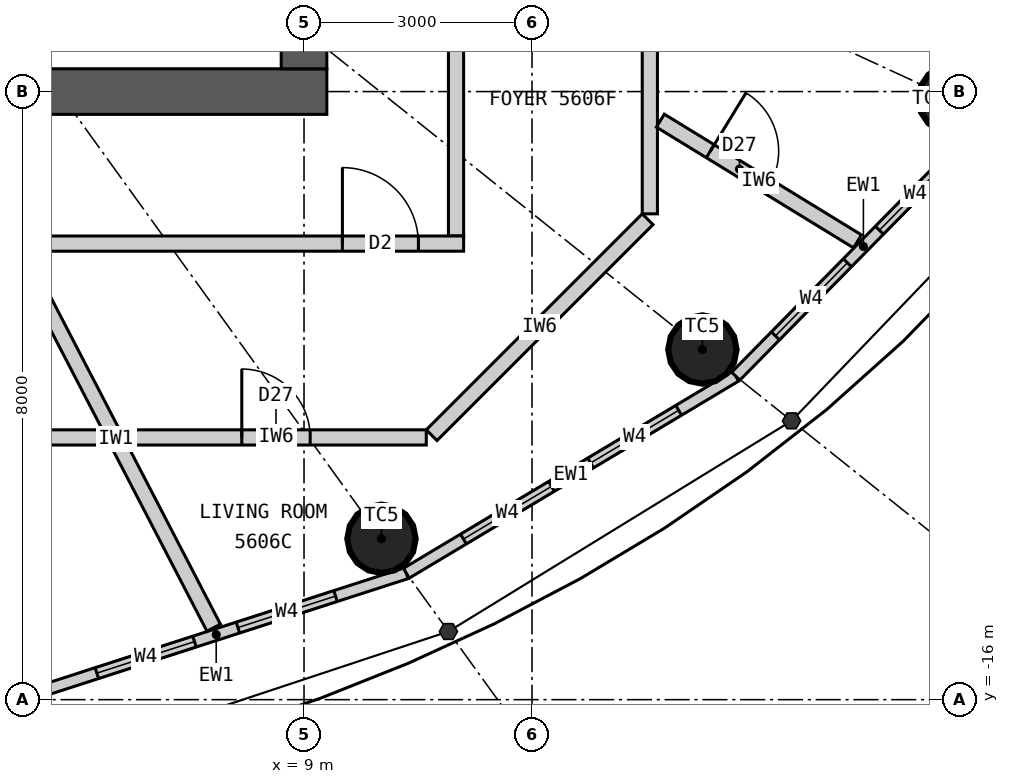
"""IFC4 building model, lengths in metres.
Left out: names, types, materials, properties, quantities, classifications, styles, units other than length and angle.
Written with IfcOpenShell. Run it as: python <this file> out.ifc"""

import sys

from ifc_helpers import new_model, si_unit, direction, frame, frame_2d, origin, origin_2d, place, context, subcontext, project, spatial, rectangle, circle, extrude, element, fill, save


model = new_model("IFC4")
c1 = context("Model", 3, precision=1e-05, world=origin(), true_north=direction((0.0, 1.0)))
c2 = subcontext(c1, "Body", "Model", "MODEL_VIEW")
j1 = project(units=[si_unit("LENGTHUNIT", "METRE"), si_unit("PLANEANGLEUNIT", "RADIAN")], contexts=[c1])
p1 = place(None, origin())
s1 = spatial("IfcSite", under=j1, at=p1, CompositionType="ELEMENT")
p2 = place(p1, origin())
s2 = spatial("IfcBuilding", under=s1, at=p2, CompositionType="ELEMENT")
p3 = place(p2, frame((0.0, 0.0, 209.4)))
s3 = spatial("IfcBuildingStorey", under=s2, at=p3, CompositionType="ELEMENT", Elevation=209.4)
for number, where, z_axis, x_axis in (
    (1, (10.019, -13.883, 0.0), (0.0, 0.0, 1.0), (1.0, 0.0, 0.0)),
    (2, (14.241, -11.393, 0.0), (0.0, 0.0, 1.0), (1.0, 0.0, 0.0)),
    (3, (17.532, -8.098, 0.0), (0.0, 0.0, 1.0), (1.0, 0.0, 0.0)),
):
    element("IfcColumn", number, at=place(p3, frame(where, z_axis=z_axis, x_axis=x_axis)), inside=s3, PredefinedType="COLUMN", context=c2, shape_type="SweptSolid", body=[
        extrude(circle(Radius=0.45, at=origin_2d()), origin(), (0.0, 0.0, 1.0), 3.3),
    ])
p4 = place(p3, frame((9.3, -8.0, 0.0), z_axis=(0.0, 0.0, 1.0), x_axis=(-1.0, 0.0, 0.0)))
e4 = element("IfcWall", 4, at=p4, inside=s3, PredefinedType="SHEAR", context=c2, shape_type="SweptSolid", body=[
    extrude(rectangle(XDim=18.6, YDim=0.6, at=frame_2d((9.3, 0.0))), origin(), (0.0, 0.0, 1.0), 3.3),
])
p5 = place(p4, frame((8.0, 0.0, 0.0)))
e5 = element("IfcOpeningElement", 5, at=p5, cuts=e4, PredefinedType="OPENING", context=c2, shape_type="SweptSolid", body=[
    extrude(rectangle(XDim=1.2, YDim=2.2, at=frame_2d((0.6, 1.1))), frame((0.0, 0.31, 0.0), z_axis=(0.0, -1.0, 0.0), x_axis=(1.0, 0.0, 0.0)), (0.0, 0.0, 1.0), 0.62),
])
p6 = place(p4, frame((15.6, 0.0, 0.0)))
e6 = element("IfcOpeningElement", 6, at=p6, cuts=e4, PredefinedType="OPENING", context=c2, shape_type="SweptSolid", body=[
    extrude(rectangle(XDim=0.9, YDim=2.2, at=frame_2d((0.45, 1.1))), frame((0.0, 0.31, 0.0), z_axis=(0.0, -1.0, 0.0), x_axis=(1.0, 0.0, 0.0)), (0.0, 0.0, 1.0), 0.62),
])
p7 = place(p3, frame((9.0, -7.7, 0.0), z_axis=(0.0, 0.0, 1.0), x_axis=(0.0, 1.0, 0.0)))
e7 = element("IfcWall", 7, at=p7, inside=s3, PredefinedType="SHEAR", context=c2, shape_type="SweptSolid", body=[
    extrude(rectangle(XDim=15.4, YDim=0.6, at=frame_2d((7.7, 0.0))), origin(), (0.0, 0.0, 1.0), 3.3),
])
p8 = place(p7, frame((6.8, 0.0, 0.0)))
e8 = element("IfcOpeningElement", 8, at=p8, cuts=e7, PredefinedType="OPENING", context=c2, shape_type="SweptSolid", body=[
    extrude(rectangle(XDim=1.8, YDim=2.2, at=frame_2d((0.9, 1.1))), frame((0.0, 0.31, 0.0), z_axis=(0.0, -1.0, 0.0), x_axis=(1.0, 0.0, 0.0)), (0.0, 0.0, 1.0), 0.62),
])
p9 = place(p3, frame((5.343, -15.952, 0.0), z_axis=(0.0, 0.0, 1.0), x_axis=(0.951644702515, 0.307200846638, 0.0)))
e9 = element("IfcWall", 9, at=p9, inside=s3, PredefinedType="ELEMENTEDWALL", context=c2, shape_type="SweptSolid", body=[
    extrude(rectangle(XDim=5.258, YDim=0.15, at=frame_2d((2.629, 0.0))), origin(), (0.0, 0.0, 1.0), 3.12),
])
p10 = place(p9, frame((0.979, 0.0, 0.9)))
e10 = element("IfcOpeningElement", 10, at=p10, cuts=e9, PredefinedType="OPENING", context=c2, shape_type="SweptSolid", body=[
    extrude(rectangle(XDim=1.35, YDim=1.9, at=frame_2d((0.675, 0.95))), frame((0.0, 0.085, 0.0), z_axis=(0.0, -1.0, 0.0), x_axis=(1.0, 0.0, 0.0)), (0.0, 0.0, 1.0), 0.17),
])
p11 = place(p9, frame((2.929, 0.0, 0.9)))
e11 = element("IfcOpeningElement", 11, at=p11, cuts=e9, PredefinedType="OPENING", context=c2, shape_type="SweptSolid", body=[
    extrude(rectangle(XDim=1.35, YDim=1.9, at=frame_2d((0.675, 0.95))), frame((0.0, 0.085, 0.0), z_axis=(0.0, -1.0, 0.0), x_axis=(1.0, 0.0, 0.0)), (0.0, 0.0, 1.0), 0.17),
])
p12 = place(p3, frame((10.346, -14.336, 0.0), z_axis=(0.0, 0.0, 1.0), x_axis=(0.85822150553, 0.513279502265, 0.0)))
e12 = element("IfcWall", 12, at=p12, inside=s3, PredefinedType="ELEMENTEDWALL", context=c2, shape_type="SweptSolid", body=[
    extrude(rectangle(XDim=5.05, YDim=0.15, at=frame_2d((2.525, 0.0))), origin(), (0.0, 0.0, 1.0), 3.12),
])
p13 = place(p12, frame((0.875, 0.0, 0.9)))
e13 = element("IfcOpeningElement", 13, at=p13, cuts=e12, PredefinedType="OPENING", context=c2, shape_type="SweptSolid", body=[
    extrude(rectangle(XDim=1.35, YDim=1.9, at=frame_2d((0.675, 0.95))), frame((0.0, 0.085, 0.0), z_axis=(0.0, -1.0, 0.0), x_axis=(1.0, 0.0, 0.0)), (0.0, 0.0, 1.0), 0.17),
])
p14 = place(p12, frame((2.825, 0.0, 0.9)))
e14 = element("IfcOpeningElement", 14, at=p14, cuts=e12, PredefinedType="OPENING", context=c2, shape_type="SweptSolid", body=[
    extrude(rectangle(XDim=1.35, YDim=1.9, at=frame_2d((0.675, 0.95))), frame((0.0, 0.085, 0.0), z_axis=(0.0, -1.0, 0.0), x_axis=(1.0, 0.0, 0.0)), (0.0, 0.0, 1.0), 0.17),
])
p15 = place(p3, frame((14.68, -11.744, 0.0), z_axis=(0.0, 0.0, 1.0), x_axis=(0.701527379618, 0.712642501993, 0.0)))
e15 = element("IfcWall", 15, at=p15, inside=s3, PredefinedType="ELEMENTEDWALL", context=c2, shape_type="SweptSolid", body=[
    extrude(rectangle(XDim=4.788, YDim=0.15, at=frame_2d((2.394, 0.0))), origin(), (0.0, 0.0, 1.0), 3.12),
])
p16 = place(p15, frame((0.744, 0.0, 0.9)))
e16 = element("IfcOpeningElement", 16, at=p16, cuts=e15, PredefinedType="OPENING", context=c2, shape_type="SweptSolid", body=[
    extrude(rectangle(XDim=1.35, YDim=1.9, at=frame_2d((0.675, 0.95))), frame((0.0, 0.085, 0.0), z_axis=(0.0, -1.0, 0.0), x_axis=(1.0, 0.0, 0.0)), (0.0, 0.0, 1.0), 0.17),
])
p17 = place(p15, frame((2.694, 0.0, 0.9)))
e17 = element("IfcOpeningElement", 17, at=p17, cuts=e15, PredefinedType="OPENING", context=c2, shape_type="SweptSolid", body=[
    extrude(rectangle(XDim=1.35, YDim=1.9, at=frame_2d((0.675, 0.95))), frame((0.0, 0.085, 0.0), z_axis=(0.0, -1.0, 0.0), x_axis=(1.0, 0.0, 0.0)), (0.0, 0.0, 1.0), 0.17),
])
p18 = place(p3, frame((11.0, -9.9, 0.0), z_axis=(0.0, 0.0, 1.0), x_axis=(0.0, 1.0, 0.0)))
e18 = element("IfcWall", 18, at=p18, inside=s3, PredefinedType="PARTITIONING", context=c2, shape_type="SweptSolid", body=[
    extrude(rectangle(XDim=19.8, YDim=0.2, at=frame_2d((9.9, 0.0))), origin(), (0.0, 0.0, 1.0), 3.12),
])
p19 = place(p3, frame((11.1, -10.0, 0.0), z_axis=(0.0, 0.0, 1.0), x_axis=(-1.0, 0.0, 0.0)))
e19 = element("IfcWall", 19, at=p19, inside=s3, PredefinedType="PARTITIONING", context=c2, shape_type="SweptSolid", body=[
    extrude(rectangle(XDim=22.2, YDim=0.2, at=frame_2d((11.1, 0.0))), origin(), (0.0, 0.0, 1.0), 3.12),
])
p20 = place(p19, frame((11.36, 0.0, 0.0)))
e20 = element("IfcOpeningElement", 20, at=p20, cuts=e19, PredefinedType="OPENING", context=c2, shape_type="SweptSolid", body=[
    extrude(rectangle(XDim=1.0, YDim=2.2, at=frame_2d((0.5, 1.1))), frame((0.0, 0.11, 0.0), z_axis=(0.0, -1.0, 0.0), x_axis=(1.0, 0.0, 0.0)), (0.0, 0.0, 1.0), 0.22),
])
p21 = place(p19, frame((0.595, 0.0, 0.0)))
e21 = element("IfcOpeningElement", 21, at=p21, cuts=e19, PredefinedType="OPENING", context=c2, shape_type="SweptSolid", body=[
    extrude(rectangle(XDim=1.0, YDim=2.2, at=frame_2d((0.5, 1.1))), frame((0.0, 0.11, 0.0), z_axis=(0.0, -1.0, 0.0), x_axis=(1.0, 0.0, 0.0)), (0.0, 0.0, 1.0), 0.22),
])
p22 = place(p3, frame((5.241, -10.1, 0.0), z_axis=(0.0, 0.0, 1.0), x_axis=(0.460603196597, -0.887606160008, 0.0)))
e22 = element("IfcWall", 22, at=p22, inside=s3, PredefinedType="PARTITIONING", context=c2, shape_type="SweptSolid", body=[
    extrude(rectangle(XDim=5.58, YDim=0.2, at=frame_2d((2.79, 0.0))), origin(), (0.0, 0.0, 1.0), 3.12),
])
p23 = place(p3, frame((-4.082, -12.55, 0.0), z_axis=(0.0, 0.0, 1.0), x_axis=(1.0, 0.0, 0.0)))
e23 = element("IfcWall", 23, at=p23, inside=s3, PredefinedType="PARTITIONING", context=c2, shape_type="SweptSolid", body=[
    extrude(rectangle(XDim=10.446, YDim=0.2, at=frame_2d((5.223, 0.0))), origin(), (0.0, 0.0, 1.0), 3.12),
])
p24 = place(p23, frame((6.757, 0.0, 0.0)))
e24 = element("IfcOpeningElement", 24, at=p24, cuts=e23, PredefinedType="OPENING", context=c2, shape_type="SweptSolid", body=[
    extrude(rectangle(XDim=0.8, YDim=2.1, at=frame_2d((0.4, 1.05))), frame((0.0, 0.11, 0.0), z_axis=(0.0, -1.0, 0.0), x_axis=(1.0, 0.0, 0.0)), (0.0, 0.0, 1.0), 0.22),
])
p25 = place(p23, frame((3.372, 0.0, 0.0)))
e25 = element("IfcOpeningElement", 25, at=p25, cuts=e23, PredefinedType="OPENING", context=c2, shape_type="SweptSolid", body=[
    extrude(rectangle(XDim=0.9, YDim=2.1, at=frame_2d((0.45, 1.05))), frame((0.0, 0.11, 0.0), z_axis=(0.0, -1.0, 0.0), x_axis=(1.0, 0.0, 0.0)), (0.0, 0.0, 1.0), 0.22),
])
p26 = place(p3, frame((6.661, -12.55, 0.0), z_axis=(0.0, 0.0, 1.0), x_axis=(1.0, 0.0, 0.0)))
e26 = element("IfcWall", 26, at=p26, inside=s3, PredefinedType="PARTITIONING", context=c2, shape_type="SweptSolid", body=[
    extrude(rectangle(XDim=3.947, YDim=0.2, at=frame_2d((1.974, 0.0))), origin(), (0.0, 0.0, 1.0), 3.12),
])
p27 = place(p26, frame((1.52, 0.0, 0.0)))
e27 = element("IfcOpeningElement", 27, at=p27, cuts=e26, PredefinedType="OPENING", context=c2, shape_type="SweptSolid", body=[
    extrude(rectangle(XDim=0.9, YDim=2.1, at=frame_2d((0.45, 1.05))), frame((0.0, 0.11, 0.0), z_axis=(0.0, -1.0, 0.0), x_axis=(1.0, 0.0, 0.0)), (0.0, 0.0, 1.0), 0.22),
])
p28 = place(p3, frame((10.679, -12.521, 0.0), z_axis=(0.0, 0.0, 1.0), x_axis=(0.707106781187, 0.707106781187, 0.0)))
e28 = element("IfcWall", 28, at=p28, inside=s3, PredefinedType="PARTITIONING", context=c2, shape_type="SweptSolid", body=[
    extrude(rectangle(XDim=4.019, YDim=0.2, at=frame_2d((2.009, 0.0))), origin(), (0.0, 0.0, 1.0), 3.12),
])
p29 = place(p3, frame((13.55, -9.609, 0.0), z_axis=(0.0, 0.0, 1.0), x_axis=(0.0, 1.0, 0.0)))
e29 = element("IfcWall", 29, at=p29, inside=s3, PredefinedType="PARTITIONING", context=c2, shape_type="SweptSolid", body=[
    extrude(rectangle(XDim=10.93, YDim=0.2, at=frame_2d((5.465, 0.0))), origin(), (0.0, 0.0, 1.0), 3.12),
])
p30 = place(p29, frame((5.02, 0.0, 0.0)))
e30 = element("IfcOpeningElement", 30, at=p30, cuts=e29, PredefinedType="OPENING", context=c2, shape_type="SweptSolid", body=[
    extrude(rectangle(XDim=0.9, YDim=2.1, at=frame_2d((0.45, 1.05))), frame((0.0, 0.11, 0.0), z_axis=(0.0, -1.0, 0.0), x_axis=(1.0, 0.0, 0.0)), (0.0, 0.0, 1.0), 0.22),
])
p31 = place(p29, frame((6.877, 0.0, 0.0)))
e31 = element("IfcOpeningElement", 31, at=p31, cuts=e29, PredefinedType="OPENING", context=c2, shape_type="SweptSolid", body=[
    extrude(rectangle(XDim=0.9, YDim=2.1, at=frame_2d((0.45, 1.05))), frame((0.0, 0.11, 0.0), z_axis=(0.0, -1.0, 0.0), x_axis=(1.0, 0.0, 0.0)), (0.0, 0.0, 1.0), 0.22),
])
p32 = place(p29, frame((8.565, 0.0, 0.0)))
e32 = element("IfcOpeningElement", 32, at=p32, cuts=e29, PredefinedType="OPENING", context=c2, shape_type="SweptSolid", body=[
    extrude(rectangle(XDim=0.8, YDim=2.1, at=frame_2d((0.4, 1.05))), frame((0.0, 0.11, 0.0), z_axis=(0.0, -1.0, 0.0), x_axis=(1.0, 0.0, 0.0)), (0.0, 0.0, 1.0), 0.22),
])
p33 = place(p3, frame((13.688, -8.382, 0.0), z_axis=(0.0, 0.0, 1.0), x_axis=(0.852783459586, -0.522264656144, 0.0)))
e33 = element("IfcWall", 33, at=p33, inside=s3, PredefinedType="PARTITIONING", context=c2, shape_type="SweptSolid", body=[
    extrude(rectangle(XDim=3.042, YDim=0.2, at=frame_2d((1.521, 0.0))), origin(), (0.0, 0.0, 1.0), 3.12),
])
p34 = place(p33, frame((0.77, 0.0, 0.0)))
e34 = element("IfcOpeningElement", 34, at=p34, cuts=e33, PredefinedType="OPENING", context=c2, shape_type="SweptSolid", body=[
    extrude(rectangle(XDim=0.9, YDim=2.1, at=frame_2d((0.45, 1.05))), frame((0.0, 0.11, 0.0), z_axis=(0.0, -1.0, 0.0), x_axis=(1.0, 0.0, 0.0)), (0.0, 0.0, 1.0), 0.22),
])
p35 = place(p10, origin())
e35 = element("IfcWindow", 35, at=p35, inside=s3, PartitioningType="SINGLE_PANEL", PredefinedType="WINDOW", context=c2, shape_type="SweptSolid", body=[
    extrude(rectangle(XDim=1.35, YDim=1.9, at=frame_2d((0.675, 0.95))), frame((0.0, 0.03, 0.0), z_axis=(0.0, -1.0, 0.0), x_axis=(1.0, 0.0, 0.0)), (0.0, 0.0, 1.0), 0.06),
])
fill(e10, e35)
p36 = place(p11, origin())
e36 = element("IfcWindow", 36, at=p36, inside=s3, PartitioningType="SINGLE_PANEL", PredefinedType="WINDOW", context=c2, shape_type="SweptSolid", body=[
    extrude(rectangle(XDim=1.35, YDim=1.9, at=frame_2d((0.675, 0.95))), frame((0.0, 0.03, 0.0), z_axis=(0.0, -1.0, 0.0), x_axis=(1.0, 0.0, 0.0)), (0.0, 0.0, 1.0), 0.06),
])
fill(e11, e36)
p37 = place(p13, origin())
e37 = element("IfcWindow", 37, at=p37, inside=s3, PartitioningType="SINGLE_PANEL", PredefinedType="WINDOW", context=c2, shape_type="SweptSolid", body=[
    extrude(rectangle(XDim=1.35, YDim=1.9, at=frame_2d((0.675, 0.95))), frame((0.0, 0.03, 0.0), z_axis=(0.0, -1.0, 0.0), x_axis=(1.0, 0.0, 0.0)), (0.0, 0.0, 1.0), 0.06),
])
fill(e13, e37)
p38 = place(p14, origin())
e38 = element("IfcWindow", 38, at=p38, inside=s3, PartitioningType="SINGLE_PANEL", PredefinedType="WINDOW", context=c2, shape_type="SweptSolid", body=[
    extrude(rectangle(XDim=1.35, YDim=1.9, at=frame_2d((0.675, 0.95))), frame((0.0, 0.03, 0.0), z_axis=(0.0, -1.0, 0.0), x_axis=(1.0, 0.0, 0.0)), (0.0, 0.0, 1.0), 0.06),
])
fill(e14, e38)
p39 = place(p16, origin())
e39 = element("IfcWindow", 39, at=p39, inside=s3, PartitioningType="SINGLE_PANEL", PredefinedType="WINDOW", context=c2, shape_type="SweptSolid", body=[
    extrude(rectangle(XDim=1.35, YDim=1.9, at=frame_2d((0.675, 0.95))), frame((0.0, 0.03, 0.0), z_axis=(0.0, -1.0, 0.0), x_axis=(1.0, 0.0, 0.0)), (0.0, 0.0, 1.0), 0.06),
])
fill(e16, e39)
p40 = place(p17, origin())
e40 = element("IfcWindow", 40, at=p40, inside=s3, PartitioningType="SINGLE_PANEL", PredefinedType="WINDOW", context=c2, shape_type="SweptSolid", body=[
    extrude(rectangle(XDim=1.35, YDim=1.9, at=frame_2d((0.675, 0.95))), frame((0.0, 0.03, 0.0), z_axis=(0.0, -1.0, 0.0), x_axis=(1.0, 0.0, 0.0)), (0.0, 0.0, 1.0), 0.06),
])
fill(e17, e40)
p41 = place(p21, origin())
e41 = element("IfcDoor", 41, at=p41, inside=s3, OperationType="SINGLE_SWING_RIGHT", PredefinedType="DOOR", context=c2, shape_type="SweptSolid", body=[
    extrude(rectangle(XDim=1.0, YDim=2.2, at=frame_2d((0.5, 1.1))), frame((0.0, 0.025, 0.0), z_axis=(0.0, -1.0, 0.0), x_axis=(1.0, 0.0, 0.0)), (0.0, 0.0, 1.0), 0.05),
])
fill(e21, e41)
p42 = place(p27, origin())
e42 = element("IfcDoor", 42, at=p42, inside=s3, OperationType="SINGLE_SWING_LEFT", PredefinedType="DOOR", context=c2, shape_type="SweptSolid", body=[
    extrude(rectangle(XDim=0.9, YDim=2.1, at=frame_2d((0.45, 1.05))), frame((0.0, 0.025, 0.0), z_axis=(0.0, -1.0, 0.0), x_axis=(1.0, 0.0, 0.0)), (0.0, 0.0, 1.0), 0.05),
])
fill(e27, e42)
p43 = place(p34, origin())
e43 = element("IfcDoor", 43, at=p43, inside=s3, OperationType="SINGLE_SWING_LEFT", PredefinedType="DOOR", context=c2, shape_type="SweptSolid", body=[
    extrude(rectangle(XDim=0.9, YDim=2.1, at=frame_2d((0.45, 1.05))), frame((0.0, 0.025, 0.0), z_axis=(0.0, -1.0, 0.0), x_axis=(1.0, 0.0, 0.0)), (0.0, 0.0, 1.0), 0.05),
])
fill(e34, e43)
save(model, sys.argv[1])
